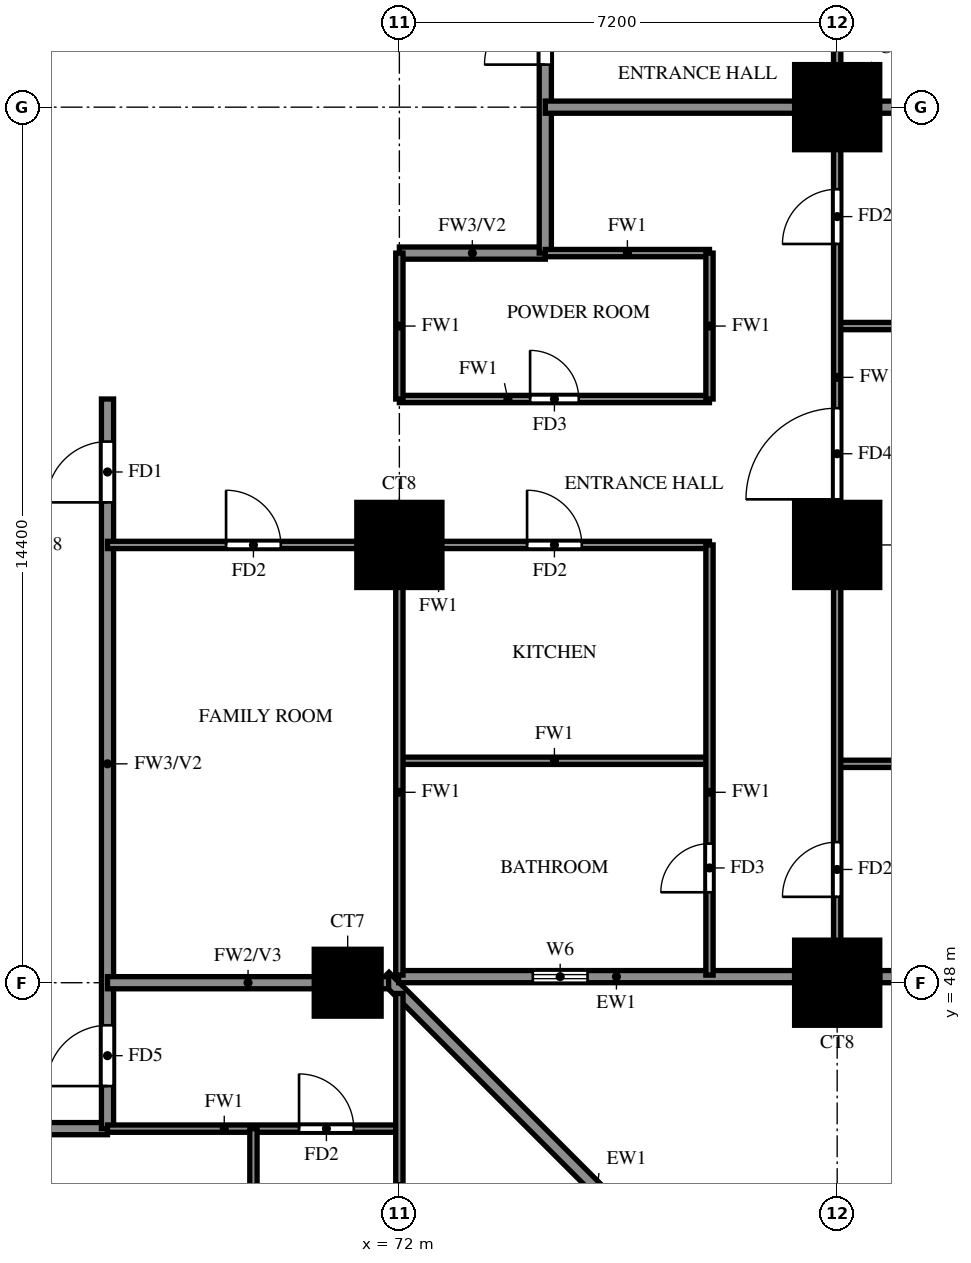
"""IFC4 building model, lengths in metres.
Left out: names, types, materials, properties, quantities, classifications, styles, units other than length and angle.
Written with IfcOpenShell. Run it as: python <this file> out.ifc"""

import sys

from ifc_helpers import new_model, si_unit, direction, frame, frame_2d, origin, origin_2d, place, context, subcontext, project, spatial, rectangle, extrude, source, transform, mapped, element, fill, save


model = new_model("IFC4")
c1 = context("Model", 3, precision=1e-05, world=origin(), true_north=direction((0.0, 1.0)))
c2 = subcontext(c1, "Body", "Model", "MODEL_VIEW")
j1 = project(units=[si_unit("LENGTHUNIT", "METRE"), si_unit("PLANEANGLEUNIT", "RADIAN")], contexts=[c1])
p1 = place(None, origin())
s1 = spatial("IfcSite", under=j1, at=p1, CompositionType="ELEMENT")
p2 = place(p1, origin())
s2 = spatial("IfcBuilding", under=s1, at=p2, CompositionType="ELEMENT")
p3 = place(p2, frame((0.0, 0.0, 48.0)))
s3 = spatial("IfcBuildingStorey", under=s2, at=p3, CompositionType="ELEMENT", Elevation=48.0)
m1 = source(origin(), c2, "Body", "SweptSolid", [
    extrude(rectangle(XDim=1.1, YDim=1.1, at=origin_2d()), origin(), (0.0, 0.0, 1.0), 3.18),
])
p4 = place(p3, frame((71.15, 48.0, 0.0), z_axis=(0.0, 0.0, 1.0), x_axis=(1.0, 0.0, 0.0)))
e1 = element("IfcColumn", 1, at=p4, inside=s3, PredefinedType="COLUMN", context=c2, shape_type="MappedRepresentation", body=[
    mapped(m1, transform((0.0, 0.0, 0.0))),
])
m2 = source(origin(), c2, "Body", "SweptSolid", [
    extrude(rectangle(XDim=1.4, YDim=1.4, at=origin_2d()), origin(), (0.0, 0.0, 1.0), 3.18),
])
for number, where, z_axis, x_axis in (
    (2, (79.2, 48.0, 0.0), (0.0, 0.0, 1.0), (1.0, 0.0, 0.0)),
    (3, (72.0, 55.2, 0.0), (0.0, 0.0, 1.0), (1.0, 0.0, 0.0)),
    (4, (79.2, 55.2, 0.0), (0.0, 0.0, 1.0), (1.0, 0.0, 0.0)),
    (5, (79.2, 62.4, 0.0), (0.0, 0.0, 1.0), (1.0, 0.0, 0.0)),
):
    element("IfcColumn", number, at=place(p3, frame(where, z_axis=z_axis, x_axis=x_axis)), inside=s3, PredefinedType="COLUMN", context=c2, shape_type="MappedRepresentation", body=[
        mapped(m2, transform((0.0, 0.0, 0.0))),
    ])
p5 = place(p3, frame((78.74, 41.118, 0.0), z_axis=(0.0, 0.0, 1.0), x_axis=(-0.707106781187, 0.707106781187, 0.0)))
e6 = element("IfcWall", 6, at=p5, inside=s3, PredefinedType="SOLIDWALL", context=c2, shape_type="SweptSolid", body=[
    extrude(rectangle(XDim=9.874, YDim=0.2, at=frame_2d((4.937, 0.0))), origin(), (0.0, 0.0, 1.0), 3.18),
])
p6 = place(p3, frame((71.989, 48.1, 0.0), z_axis=(0.0, 0.0, 1.0), x_axis=(1.0, 0.0, 0.0)))
e7 = element("IfcWall", 7, at=p6, inside=s3, PredefinedType="SOLIDWALL", context=c2, shape_type="SweptSolid", body=[
    extrude(rectangle(XDim=6.511, YDim=0.2, at=frame_2d((3.256, 0.0))), origin(), (0.0, 0.0, 1.0), 3.18),
])
p7 = place(p6, frame((2.206, 0.0, 1.5)))
e8 = element("IfcOpeningElement", 8, at=p7, cuts=e7, PredefinedType="OPENING", context=c2, shape_type="SweptSolid", body=[
    extrude(rectangle(XDim=0.9, YDim=0.9, at=frame_2d((0.45, 0.45))), frame((0.0, 0.11, 0.0), z_axis=(0.0, -1.0, 0.0), x_axis=(1.0, 0.0, 0.0)), (0.0, 0.0, 1.0), 0.22),
])
p8 = place(p3, frame((79.9, 48.1, 0.0), z_axis=(0.0, 0.0, 1.0), x_axis=(1.0, 0.0, 0.0)))
e9 = element("IfcWall", 9, at=p8, inside=s3, PredefinedType="SOLIDWALL", context=c2, shape_type="SweptSolid", body=[
    extrude(rectangle(XDim=5.35, YDim=0.2, at=frame_2d((2.675, 0.0))), origin(), (0.0, 0.0, 1.0), 3.18),
])
p9 = place(p8, frame((1.475, 0.0, 0.6)))
e10 = element("IfcOpeningElement", 10, at=p9, cuts=e9, PredefinedType="OPENING", context=c2, shape_type="SweptSolid", body=[
    extrude(rectangle(XDim=2.4, YDim=2.4, at=frame_2d((1.2, 1.2))), frame((0.0, 0.11, 0.0), z_axis=(0.0, -1.0, 0.0), x_axis=(1.0, 0.0, 0.0)), (0.0, 0.0, 1.0), 0.22),
])
p10 = place(p3, frame((60.0, 45.6, 0.0), z_axis=(0.0, 0.0, 1.0), x_axis=(1.0, 0.0, 0.0)))
e11 = element("IfcWall", 11, at=p10, inside=s3, PredefinedType="SOLIDWALL", context=c2, shape_type="SweptSolid", body=[
    extrude(rectangle(XDim=7.2, YDim=0.2, at=frame_2d((3.6, 0.0))), origin(), (0.0, 0.0, 1.0), 3.18),
])
p11 = place(p3, frame((72.0, 60.0, 0.0), z_axis=(0.0, 0.0, 1.0), x_axis=(1.0, 0.0, 0.0)))
e12 = element("IfcWall", 12, at=p11, inside=s3, PredefinedType="SOLIDWALL", context=c2, shape_type="SweptSolid", body=[
    extrude(rectangle(XDim=2.4, YDim=0.2, at=frame_2d((1.2, 0.0))), origin(), (0.0, 0.0, 1.0), 3.18),
])
p12 = place(p3, frame((67.2, 45.6, 0.0), z_axis=(0.0, 0.0, 1.0), x_axis=(0.0, 1.0, 0.0)))
e13 = element("IfcWall", 13, at=p12, inside=s3, PredefinedType="SOLIDWALL", context=c2, shape_type="SweptSolid", body=[
    extrude(rectangle(XDim=12.0, YDim=0.2, at=frame_2d((6.0, 0.0))), origin(), (0.0, 0.0, 1.0), 3.18),
])
p13 = place(p12, frame((10.3, 0.0, 0.0)))
e14 = element("IfcOpeningElement", 14, at=p13, cuts=e13, PredefinedType="OPENING", context=c2, shape_type="SweptSolid", body=[
    extrude(rectangle(XDim=1.0, YDim=2.1, at=frame_2d((0.5, 1.05))), frame((0.0, 0.11, 0.0), z_axis=(0.0, -1.0, 0.0), x_axis=(1.0, 0.0, 0.0)), (0.0, 0.0, 1.0), 0.22),
])
p14 = place(p12, frame((0.7, 0.0, 0.0)))
e15 = element("IfcOpeningElement", 15, at=p14, cuts=e13, PredefinedType="OPENING", context=c2, shape_type="SweptSolid", body=[
    extrude(rectangle(XDim=1.0, YDim=2.1, at=frame_2d((0.5, 1.05))), frame((0.0, 0.11, 0.0), z_axis=(0.0, -1.0, 0.0), x_axis=(1.0, 0.0, 0.0)), (0.0, 0.0, 1.0), 0.22),
])
p15 = place(p3, frame((74.4, 60.0, 0.0), z_axis=(0.0, 0.0, 1.0), x_axis=(0.0, 1.0, 0.0)))
e16 = element("IfcWall", 16, at=p15, inside=s3, PredefinedType="SOLIDWALL", context=c2, shape_type="SweptSolid", body=[
    extrude(rectangle(XDim=9.45, YDim=0.2, at=frame_2d((4.725, 0.0))), origin(), (0.0, 0.0, 1.0), 3.18),
])
p16 = place(p15, frame((3.1, 0.0, 0.0)))
e17 = element("IfcOpeningElement", 17, at=p16, cuts=e16, PredefinedType="OPENING", context=c2, shape_type="SweptSolid", body=[
    extrude(rectangle(XDim=1.0, YDim=2.1, at=frame_2d((0.5, 1.05))), frame((0.0, 0.11, 0.0), z_axis=(0.0, -1.0, 0.0), x_axis=(1.0, 0.0, 0.0)), (0.0, 0.0, 1.0), 0.22),
])
p17 = place(p3, frame((67.2, 48.0, 0.0), z_axis=(0.0, 0.0, 1.0), x_axis=(1.0, 0.0, 0.0)))
e18 = element("IfcWall", 18, at=p17, inside=s3, PredefinedType="SOLIDWALL", context=c2, shape_type="SweptSolid", body=[
    extrude(rectangle(XDim=4.623, YDim=0.2, at=frame_2d((2.312, 0.0))), origin(), (0.0, 0.0, 1.0), 3.18),
])
p18 = place(p3, frame((74.4, 62.4, 0.0), z_axis=(0.0, 0.0, 1.0), x_axis=(1.0, 0.0, 0.0)))
e19 = element("IfcWall", 19, at=p18, inside=s3, PredefinedType="SOLIDWALL", context=c2, shape_type="SweptSolid", body=[
    extrude(rectangle(XDim=11.875, YDim=0.2, at=frame_2d((5.938, 0.0))), origin(), (0.0, 0.0, 1.0), 3.18),
])
p19 = place(p3, frame((67.2, 45.6, 0.0), z_axis=(0.0, 0.0, 1.0), x_axis=(1.0, 0.0, 0.0)))
e20 = element("IfcWall", 20, at=p19, inside=s3, PredefinedType="PARTITIONING", context=c2, shape_type="SweptSolid", body=[
    extrude(rectangle(XDim=4.8, YDim=0.12, at=frame_2d((2.4, 0.0))), origin(), (0.0, 0.0, 1.0), 3.18),
])
p20 = place(p19, frame((3.15, 0.0, 0.0)))
e21 = element("IfcOpeningElement", 21, at=p20, cuts=e20, PredefinedType="OPENING", context=c2, shape_type="SweptSolid", body=[
    extrude(rectangle(XDim=0.9, YDim=2.1, at=frame_2d((0.45, 1.05))), frame((0.0, 0.07, 0.0), z_axis=(0.0, -1.0, 0.0), x_axis=(1.0, 0.0, 0.0)), (0.0, 0.0, 1.0), 0.14),
])
p21 = place(p3, frame((79.2, 51.6, 0.0), z_axis=(0.0, 0.0, 1.0), x_axis=(1.0, 0.0, 0.0)))
e22 = element("IfcWall", 22, at=p21, inside=s3, PredefinedType="PARTITIONING", context=c2, shape_type="SweptSolid", body=[
    extrude(rectangle(XDim=7.075, YDim=0.12, at=frame_2d((3.538, 0.0))), origin(), (0.0, 0.0, 1.0), 2.28),
])
p22 = place(p3, frame((72.0, 51.65, 0.0), z_axis=(0.0, 0.0, 1.0), x_axis=(1.0, 0.0, 0.0)))
e23 = element("IfcWall", 23, at=p22, inside=s3, PredefinedType="PARTITIONING", context=c2, shape_type="SweptSolid", body=[
    extrude(rectangle(XDim=5.1, YDim=0.12, at=frame_2d((2.55, 0.0))), origin(), (0.0, 0.0, 1.0), 3.18),
])
p23 = place(p3, frame((67.2, 55.2, 0.0), z_axis=(0.0, 0.0, 1.0), x_axis=(1.0, 0.0, 0.0)))
e24 = element("IfcWall", 24, at=p23, inside=s3, PredefinedType="PARTITIONING", context=c2, shape_type="SweptSolid", body=[
    extrude(rectangle(XDim=9.9, YDim=0.12, at=frame_2d((4.95, 0.0))), origin(), (0.0, 0.0, 1.0), 3.18),
])
p24 = place(p23, frame((6.9, 0.0, 0.0)))
e25 = element("IfcOpeningElement", 25, at=p24, cuts=e24, PredefinedType="OPENING", context=c2, shape_type="SweptSolid", body=[
    extrude(rectangle(XDim=0.9, YDim=2.1, at=frame_2d((0.45, 1.05))), frame((0.0, 0.07, 0.0), z_axis=(0.0, -1.0, 0.0), x_axis=(1.0, 0.0, 0.0)), (0.0, 0.0, 1.0), 0.14),
])
p25 = place(p23, frame((1.95, 0.0, 0.0)))
e26 = element("IfcOpeningElement", 26, at=p25, cuts=e24, PredefinedType="OPENING", context=c2, shape_type="SweptSolid", body=[
    extrude(rectangle(XDim=0.9, YDim=2.1, at=frame_2d((0.45, 1.05))), frame((0.0, 0.07, 0.0), z_axis=(0.0, -1.0, 0.0), x_axis=(1.0, 0.0, 0.0)), (0.0, 0.0, 1.0), 0.14),
])
p26 = place(p3, frame((72.0, 57.6, 0.0), z_axis=(0.0, 0.0, 1.0), x_axis=(1.0, 0.0, 0.0)))
e27 = element("IfcWall", 27, at=p26, inside=s3, PredefinedType="PARTITIONING", context=c2, shape_type="SweptSolid", body=[
    extrude(rectangle(XDim=5.1, YDim=0.12, at=frame_2d((2.55, 0.0))), origin(), (0.0, 0.0, 1.0), 3.18),
])
p27 = place(p26, frame((2.15, 0.0, 0.0)))
e28 = element("IfcOpeningElement", 28, at=p27, cuts=e27, PredefinedType="OPENING", context=c2, shape_type="SweptSolid", body=[
    extrude(rectangle(XDim=0.8, YDim=2.1, at=frame_2d((0.4, 1.05))), frame((0.0, 0.07, 0.0), z_axis=(0.0, -1.0, 0.0), x_axis=(1.0, 0.0, 0.0)), (0.0, 0.0, 1.0), 0.14),
])
p28 = place(p3, frame((79.2, 58.8, 0.0), z_axis=(0.0, 0.0, 1.0), x_axis=(1.0, 0.0, 0.0)))
e29 = element("IfcWall", 29, at=p28, inside=s3, PredefinedType="PARTITIONING", context=c2, shape_type="SweptSolid", body=[
    extrude(rectangle(XDim=7.075, YDim=0.12, at=frame_2d((3.538, 0.0))), origin(), (0.0, 0.0, 1.0), 2.28),
])
for number, where, z_axis, x_axis in (
    (30, (74.4, 60.0, 0.0), (0.0, 0.0, 1.0), (1.0, 0.0, 0.0)),
    (31, (69.6, 42.9, 0.0), (0.0, 0.0, 1.0), (0.0, 1.0, 0.0)),
):
    element("IfcWall", number, at=place(p3, frame(where, z_axis=z_axis, x_axis=x_axis)), inside=s3, PredefinedType="PARTITIONING", context=c2, shape_type="SweptSolid", body=[
        extrude(rectangle(XDim=2.7, YDim=0.12, at=frame_2d((1.35, 0.0))), origin(), (0.0, 0.0, 1.0), 3.18),
    ])
p29 = place(p3, frame((72.0, 33.725, 0.0), z_axis=(0.0, 0.0, 1.0), x_axis=(0.0, 1.0, 0.0)))
e32 = element("IfcWall", 32, at=p29, inside=s3, PredefinedType="PARTITIONING", context=c2, shape_type="SweptSolid", body=[
    extrude(rectangle(XDim=14.098, YDim=0.12, at=frame_2d((7.049, 0.0))), origin(), (0.0, 0.0, 1.0), 2.28),
])
p30 = place(p29, frame((10.075, 0.0, 0.0)))
e33 = element("IfcOpeningElement", 33, at=p30, cuts=e32, PredefinedType="OPENING", context=c2, shape_type="SweptSolid", body=[
    extrude(rectangle(XDim=0.9, YDim=2.1, at=frame_2d((0.45, 1.05))), frame((0.0, 0.07, 0.0), z_axis=(0.0, -1.0, 0.0), x_axis=(1.0, 0.0, 0.0)), (0.0, 0.0, 1.0), 0.14),
])
p31 = place(p3, frame((72.0, 48.125, 0.0), z_axis=(0.0, 0.0, 1.0), x_axis=(0.0, 1.0, 0.0)))
e34 = element("IfcWall", 34, at=p31, inside=s3, PredefinedType="PARTITIONING", context=c2, shape_type="SweptSolid", body=[
    extrude(rectangle(XDim=7.075, YDim=0.12, at=frame_2d((3.538, 0.0))), origin(), (0.0, 0.0, 1.0), 3.18),
])
p32 = place(p3, frame((72.0, 57.6, 0.0), z_axis=(0.0, 0.0, 1.0), x_axis=(0.0, 1.0, 0.0)))
e35 = element("IfcWall", 35, at=p32, inside=s3, PredefinedType="PARTITIONING", context=c2, shape_type="SweptSolid", body=[
    extrude(rectangle(XDim=2.4, YDim=0.12, at=frame_2d((1.2, 0.0))), origin(), (0.0, 0.0, 1.0), 3.18),
])
p33 = place(p3, frame((77.1, 48.125, 0.0), z_axis=(0.0, 0.0, 1.0), x_axis=(0.0, 1.0, 0.0)))
e36 = element("IfcWall", 36, at=p33, inside=s3, PredefinedType="PARTITIONING", context=c2, shape_type="SweptSolid", body=[
    extrude(rectangle(XDim=7.075, YDim=0.12, at=frame_2d((3.538, 0.0))), origin(), (0.0, 0.0, 1.0), 3.18),
])
p34 = place(p33, frame((1.363, 0.0, 0.0)))
e37 = element("IfcOpeningElement", 37, at=p34, cuts=e36, PredefinedType="OPENING", context=c2, shape_type="SweptSolid", body=[
    extrude(rectangle(XDim=0.8, YDim=2.1, at=frame_2d((0.4, 1.05))), frame((0.0, 0.07, 0.0), z_axis=(0.0, -1.0, 0.0), x_axis=(1.0, 0.0, 0.0)), (0.0, 0.0, 1.0), 0.14),
])
p35 = place(p3, frame((77.1, 57.6, 0.0), z_axis=(0.0, 0.0, 1.0), x_axis=(0.0, 1.0, 0.0)))
e38 = element("IfcWall", 38, at=p35, inside=s3, PredefinedType="PARTITIONING", context=c2, shape_type="SweptSolid", body=[
    extrude(rectangle(XDim=2.4, YDim=0.12, at=frame_2d((1.2, 0.0))), origin(), (0.0, 0.0, 1.0), 3.18),
])
p36 = place(p3, frame((79.2, 48.125, 0.0), z_axis=(0.0, 0.0, 1.0), x_axis=(0.0, 1.0, 0.0)))
e39 = element("IfcWall", 39, at=p36, inside=s3, PredefinedType="PARTITIONING", context=c2, shape_type="SweptSolid", body=[
    extrude(rectangle(XDim=17.875, YDim=0.12, at=frame_2d((8.938, 0.0))), origin(), (0.0, 0.0, 1.0), 3.18),
])
p37 = place(p36, frame((1.288, 0.0, 0.0)))
e40 = element("IfcOpeningElement", 40, at=p37, cuts=e39, PredefinedType="OPENING", context=c2, shape_type="SweptSolid", body=[
    extrude(rectangle(XDim=0.9, YDim=2.1, at=frame_2d((0.45, 1.05))), frame((0.0, 0.07, 0.0), z_axis=(0.0, -1.0, 0.0), x_axis=(1.0, 0.0, 0.0)), (0.0, 0.0, 1.0), 0.14),
])
p38 = place(p36, frame((7.825, 0.0, 0.0)))
e41 = element("IfcOpeningElement", 41, at=p38, cuts=e39, PredefinedType="OPENING", context=c2, shape_type="SweptSolid", body=[
    extrude(rectangle(XDim=1.5, YDim=2.1, at=frame_2d((0.75, 1.05))), frame((0.0, 0.07, 0.0), z_axis=(0.0, -1.0, 0.0), x_axis=(1.0, 0.0, 0.0)), (0.0, 0.0, 1.0), 0.14),
])
p39 = place(p36, frame((12.025, 0.0, 0.0)))
e42 = element("IfcOpeningElement", 42, at=p39, cuts=e39, PredefinedType="OPENING", context=c2, shape_type="SweptSolid", body=[
    extrude(rectangle(XDim=0.9, YDim=2.1, at=frame_2d((0.45, 1.05))), frame((0.0, 0.07, 0.0), z_axis=(0.0, -1.0, 0.0), x_axis=(1.0, 0.0, 0.0)), (0.0, 0.0, 1.0), 0.14),
])
p40 = place(p36, frame((15.625, 0.0, 0.0)))
e43 = element("IfcOpeningElement", 43, at=p40, cuts=e39, PredefinedType="OPENING", context=c2, shape_type="SweptSolid", body=[
    extrude(rectangle(XDim=0.9, YDim=2.1, at=frame_2d((0.45, 1.05))), frame((0.0, 0.07, 0.0), z_axis=(0.0, -1.0, 0.0), x_axis=(1.0, 0.0, 0.0)), (0.0, 0.0, 1.0), 0.14),
])
p41 = place(p7, origin())
e44 = element("IfcWindow", 44, at=p41, inside=s3, PartitioningType="SINGLE_PANEL", PredefinedType="WINDOW", context=c2, shape_type="SweptSolid", body=[
    extrude(rectangle(XDim=0.9, YDim=0.9, at=frame_2d((0.45, 0.45))), frame((0.0, 0.03, 0.0), z_axis=(0.0, -1.0, 0.0), x_axis=(1.0, 0.0, 0.0)), (0.0, 0.0, 1.0), 0.06),
])
fill(e8, e44)
p42 = place(p13, origin())
e45 = element("IfcDoor", 45, at=p42, inside=s3, OperationType="SINGLE_SWING_LEFT", PredefinedType="DOOR", context=c2, shape_type="SweptSolid", body=[
    extrude(rectangle(XDim=1.0, YDim=2.1, at=frame_2d((0.5, 1.05))), frame((0.0, 0.025, 0.0), z_axis=(0.0, -1.0, 0.0), x_axis=(1.0, 0.0, 0.0)), (0.0, 0.0, 1.0), 0.05),
])
fill(e14, e45)
p43 = place(p37, origin())
e46 = element("IfcDoor", 46, at=p43, inside=s3, OperationType="SINGLE_SWING_RIGHT", PredefinedType="DOOR", context=c2, shape_type="SweptSolid", body=[
    extrude(rectangle(XDim=0.9, YDim=2.1, at=frame_2d((0.45, 1.05))), frame((0.0, 0.025, 0.0), z_axis=(0.0, -1.0, 0.0), x_axis=(1.0, 0.0, 0.0)), (0.0, 0.0, 1.0), 0.05),
])
fill(e40, e46)
p44 = place(p38, origin())
e47 = element("IfcDoor", 47, at=p44, inside=s3, OperationType="SINGLE_SWING_RIGHT", PredefinedType="DOOR", context=c2, shape_type="SweptSolid", body=[
    extrude(rectangle(XDim=1.5, YDim=2.1, at=frame_2d((0.75, 1.05))), frame((0.0, 0.025, 0.0), z_axis=(0.0, -1.0, 0.0), x_axis=(1.0, 0.0, 0.0)), (0.0, 0.0, 1.0), 0.05),
])
fill(e41, e47)
p45 = place(p39, origin())
e48 = element("IfcDoor", 48, at=p45, inside=s3, OperationType="SINGLE_SWING_LEFT", PredefinedType="DOOR", context=c2, shape_type="SweptSolid", body=[
    extrude(rectangle(XDim=0.9, YDim=2.1, at=frame_2d((0.45, 1.05))), frame((0.0, 0.025, 0.0), z_axis=(0.0, -1.0, 0.0), x_axis=(1.0, 0.0, 0.0)), (0.0, 0.0, 1.0), 0.05),
])
fill(e42, e48)
p46 = place(p34, origin())
e49 = element("IfcDoor", 49, at=p46, inside=s3, OperationType="SINGLE_SWING_RIGHT", PredefinedType="DOOR", context=c2, shape_type="SweptSolid", body=[
    extrude(rectangle(XDim=0.8, YDim=2.1, at=frame_2d((0.4, 1.05))), frame((0.0, 0.025, 0.0), z_axis=(0.0, -1.0, 0.0), x_axis=(1.0, 0.0, 0.0)), (0.0, 0.0, 1.0), 0.05),
])
fill(e37, e49)
p47 = place(p24, origin())
e50 = element("IfcDoor", 50, at=p47, inside=s3, OperationType="SINGLE_SWING_LEFT", PredefinedType="DOOR", context=c2, shape_type="SweptSolid", body=[
    extrude(rectangle(XDim=0.9, YDim=2.1, at=frame_2d((0.45, 1.05))), frame((0.0, 0.025, 0.0), z_axis=(0.0, -1.0, 0.0), x_axis=(1.0, 0.0, 0.0)), (0.0, 0.0, 1.0), 0.05),
])
fill(e25, e50)
p48 = place(p27, origin())
e51 = element("IfcDoor", 51, at=p48, inside=s3, OperationType="SINGLE_SWING_LEFT", PredefinedType="DOOR", context=c2, shape_type="SweptSolid", body=[
    extrude(rectangle(XDim=0.8, YDim=2.1, at=frame_2d((0.4, 1.05))), frame((0.0, 0.025, 0.0), z_axis=(0.0, -1.0, 0.0), x_axis=(1.0, 0.0, 0.0)), (0.0, 0.0, 1.0), 0.05),
])
fill(e28, e51)
p49 = place(p25, origin())
e52 = element("IfcDoor", 52, at=p49, inside=s3, OperationType="SINGLE_SWING_RIGHT", PredefinedType="DOOR", context=c2, shape_type="SweptSolid", body=[
    extrude(rectangle(XDim=0.9, YDim=2.1, at=frame_2d((0.45, 1.05))), frame((0.0, 0.025, 0.0), z_axis=(0.0, -1.0, 0.0), x_axis=(1.0, 0.0, 0.0)), (0.0, 0.0, 1.0), 0.05),
])
fill(e26, e52)
p50 = place(p16, origin())
e53 = element("IfcDoor", 53, at=p50, inside=s3, OperationType="SINGLE_SWING_RIGHT", PredefinedType="DOOR", context=c2, shape_type="SweptSolid", body=[
    extrude(rectangle(XDim=1.0, YDim=2.1, at=frame_2d((0.5, 1.05))), frame((0.0, 0.025, 0.0), z_axis=(0.0, -1.0, 0.0), x_axis=(1.0, 0.0, 0.0)), (0.0, 0.0, 1.0), 0.05),
])
fill(e17, e53)
p51 = place(p20, origin())
e54 = element("IfcDoor", 54, at=p51, inside=s3, OperationType="SINGLE_SWING_LEFT", PredefinedType="DOOR", context=c2, shape_type="SweptSolid", body=[
    extrude(rectangle(XDim=0.9, YDim=2.1, at=frame_2d((0.45, 1.05))), frame((0.0, 0.025, 0.0), z_axis=(0.0, -1.0, 0.0), x_axis=(1.0, 0.0, 0.0)), (0.0, 0.0, 1.0), 0.05),
])
fill(e21, e54)
p52 = place(p14, origin())
e55 = element("IfcDoor", 55, at=p52, inside=s3, OperationType="SINGLE_SWING_LEFT", PredefinedType="DOOR", context=c2, shape_type="SweptSolid", body=[
    extrude(rectangle(XDim=1.0, YDim=2.1, at=frame_2d((0.5, 1.05))), frame((0.0, 0.025, 0.0), z_axis=(0.0, -1.0, 0.0), x_axis=(1.0, 0.0, 0.0)), (0.0, 0.0, 1.0), 0.05),
])
fill(e15, e55)
save(model, sys.argv[1])
